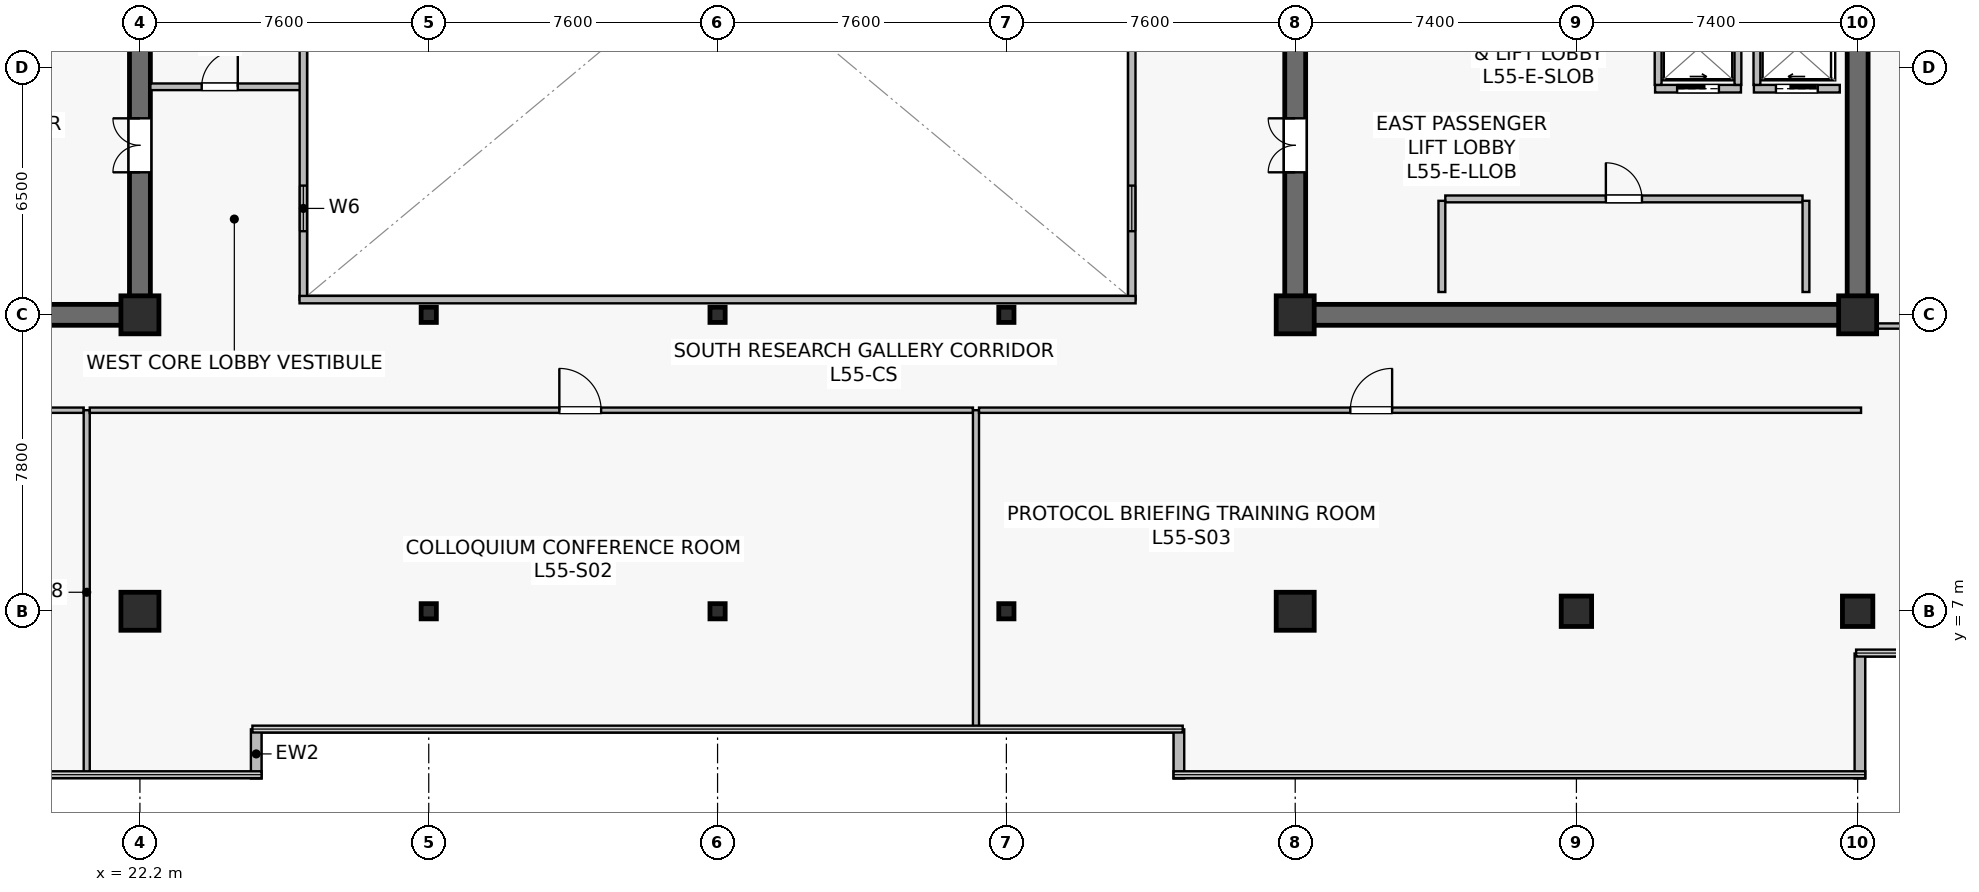
"""IFC4 building model, lengths in metres.
Left out: names, types, materials, properties, quantities, classifications, styles, units other than length and angle.
Written with IfcOpenShell. Run it as: python <this file> out.ifc"""

import sys

from ifc_helpers import new_model, si_unit, direction, frame, frame_2d, origin, origin_2d, place, context, subcontext, project, spatial, rectangle, hollow_rectangle, extrude, source, transform, mapped, element, fill, save


model = new_model("IFC4")
c1 = context("Model", 3, precision=1e-05, world=origin(), true_north=direction((0.0, 1.0)))
c2 = subcontext(c1, "Body", "Model", "MODEL_VIEW")
j1 = project(units=[si_unit("LENGTHUNIT", "METRE"), si_unit("PLANEANGLEUNIT", "RADIAN")], contexts=[c1])
p1 = place(None, origin())
s1 = spatial("IfcSite", under=j1, at=p1, CompositionType="ELEMENT")
p2 = place(p1, origin())
s2 = spatial("IfcBuilding", under=s1, at=p2, CompositionType="ELEMENT")
p3 = place(p2, frame((0.0, 0.0, 230.1)))
s3 = spatial("IfcBuildingStorey", under=s2, at=p3, CompositionType="ELEMENT", Elevation=230.1)
p4 = place(p3, frame((7.125, 14.8, 0.0), z_axis=(0.0, 0.0, 1.0), x_axis=(1.0, 0.0, 0.0)))
e1 = element("IfcWall", 1, at=p4, inside=s3, PredefinedType="SHEAR", context=c2, shape_type="SweptSolid", body=[
    extrude(rectangle(XDim=15.35, YDim=0.55, at=frame_2d((7.675, 0.0))), origin(), (0.0, 0.0, 1.0), 3.8),
])
p5 = place(p3, frame((22.2, 15.075, 0.0), z_axis=(0.0, 0.0, 1.0), x_axis=(0.0, 1.0, 0.0)))
e2 = element("IfcWall", 2, at=p5, inside=s3, PredefinedType="SHEAR", context=c2, shape_type="SweptSolid", body=[
    extrude(rectangle(XDim=18.45, YDim=0.55, at=frame_2d((9.225, 0.0))), origin(), (0.0, 0.0, 1.0), 3.8),
])
p6 = place(p5, frame((3.475, 0.0, 0.0)))
e3 = element("IfcOpeningElement", 3, at=p6, cuts=e2, PredefinedType="OPENING", context=c2, shape_type="SweptSolid", body=[
    extrude(rectangle(XDim=1.42, YDim=2.2, at=frame_2d((0.71, 1.1))), frame((0.0, 0.285, 0.0), z_axis=(0.0, -1.0, 0.0), x_axis=(1.0, 0.0, 0.0)), (0.0, 0.0, 1.0), 0.57),
])
p7 = place(p3, frame((52.325, 14.8, 0.0), z_axis=(0.0, 0.0, 1.0), x_axis=(1.0, 0.0, 0.0)))
e4 = element("IfcWall", 4, at=p7, inside=s3, PredefinedType="SHEAR", context=c2, shape_type="SweptSolid", body=[
    extrude(rectangle(XDim=15.35, YDim=0.55, at=frame_2d((7.675, 0.0))), origin(), (0.0, 0.0, 1.0), 3.8),
])
p8 = place(p3, frame((52.6, 15.075, 0.0), z_axis=(0.0, 0.0, 1.0), x_axis=(0.0, 1.0, 0.0)))
e5 = element("IfcWall", 5, at=p8, inside=s3, PredefinedType="SHEAR", context=c2, shape_type="SweptSolid", body=[
    extrude(rectangle(XDim=18.45, YDim=0.55, at=frame_2d((9.225, 0.0))), origin(), (0.0, 0.0, 1.0), 3.8),
])
p9 = place(p8, frame((3.475, 0.0, 0.0)))
e6 = element("IfcOpeningElement", 6, at=p9, cuts=e5, PredefinedType="OPENING", context=c2, shape_type="SweptSolid", body=[
    extrude(rectangle(XDim=1.42, YDim=2.2, at=frame_2d((0.71, 1.1))), frame((0.0, 0.285, 0.0), z_axis=(0.0, -1.0, 0.0), x_axis=(1.0, 0.0, 0.0)), (0.0, 0.0, 1.0), 0.57),
])
p10 = place(p3, frame((67.4, 15.075, 0.0), z_axis=(0.0, 0.0, 1.0), x_axis=(0.0, 1.0, 0.0)))
e7 = element("IfcWall", 7, at=p10, inside=s3, PredefinedType="SHEAR", context=c2, shape_type="SweptSolid", body=[
    extrude(rectangle(XDim=18.45, YDim=0.55, at=frame_2d((9.225, 0.0))), origin(), (0.0, 0.0, 1.0), 3.8),
])
m1 = source(origin(), c2, "Body", "SweptSolid", [
    extrude(rectangle(XDim=1.0, YDim=1.0, at=origin_2d()), origin(), (0.0, 0.0, 1.0), 4.1),
])
for number, where, z_axis, x_axis in (
    (8, (22.2, 7.0, 0.0), (0.0, 0.0, 1.0), (1.0, 0.0, 0.0)),
    (9, (22.2, 14.8, 0.0), (0.0, 0.0, 1.0), (1.0, 0.0, 0.0)),
    (10, (52.6, 7.0, 0.0), (0.0, 0.0, 1.0), (1.0, 0.0, 0.0)),
):
    element("IfcColumn", number, at=place(p3, frame(where, z_axis=z_axis, x_axis=x_axis)), inside=s3, PredefinedType="COLUMN", context=c2, shape_type="MappedRepresentation", body=[
        mapped(m1, transform((0.0, 0.0, 0.0), scale=1.0)),
    ])
m2 = source(origin(), c2, "Body", "SweptSolid", [
    extrude(rectangle(XDim=0.8, YDim=0.8, at=origin_2d()), origin(), (0.0, 0.0, 1.0), 4.1),
])
p11 = place(p3, frame((60.0, 7.0, 0.0), z_axis=(0.0, 0.0, 1.0), x_axis=(1.0, 0.0, 0.0)))
e11 = element("IfcColumn", 11, at=p11, inside=s3, PredefinedType="COLUMN", context=c2, shape_type="MappedRepresentation", body=[
    mapped(m2, transform((0.0, 0.0, 0.0), scale=1.0)),
])
for number, where, z_axis, x_axis in (
    (12, (52.6, 14.8, 0.0), (0.0, 0.0, 1.0), (1.0, 0.0, 0.0)),
    (13, (67.4, 14.8, 0.0), (0.0, 0.0, 1.0), (1.0, 0.0, 0.0)),
):
    element("IfcColumn", number, at=place(p3, frame(where, z_axis=z_axis, x_axis=x_axis)), inside=s3, PredefinedType="COLUMN", context=c2, shape_type="MappedRepresentation", body=[
        mapped(m1, transform((0.0, 0.0, 0.0), scale=1.0)),
    ])
p12 = place(p3, frame((67.4, 7.0, 0.0), z_axis=(0.0, 0.0, 1.0), x_axis=(1.0, 0.0, 0.0)))
e14 = element("IfcColumn", 14, at=p12, inside=s3, PredefinedType="COLUMN", context=c2, shape_type="MappedRepresentation", body=[
    mapped(m2, transform((0.0, 0.0, 0.0), scale=1.0)),
])
m3 = source(origin(), c2, "Body", "SweptSolid", [
    extrude(hollow_rectangle(XDim=0.4, YDim=0.4, WallThickness=0.019, at=origin_2d()), origin(), (0.0, 0.0, 1.0), 4.1),
])
for number, where, z_axis, x_axis in (
    (15, (29.8, 7.0, 0.0), (0.0, 0.0, 1.0), (1.0, 0.0, 0.0)),
    (16, (29.8, 14.8, 0.0), (0.0, 0.0, 1.0), (1.0, 0.0, 0.0)),
    (17, (37.4, 7.0, 0.0), (0.0, 0.0, 1.0), (1.0, 0.0, 0.0)),
    (18, (37.4, 14.8, 0.0), (0.0, 0.0, 1.0), (1.0, 0.0, 0.0)),
    (19, (45.0, 7.0, 0.0), (0.0, 0.0, 1.0), (1.0, 0.0, 0.0)),
    (20, (45.0, 14.8, 0.0), (0.0, 0.0, 1.0), (1.0, 0.0, 0.0)),
):
    element("IfcColumn", number, at=place(p3, frame(where, z_axis=z_axis, x_axis=x_axis)), inside=s3, PredefinedType="COLUMN", context=c2, shape_type="MappedRepresentation", body=[
        mapped(m3, transform((0.0, 0.0, 0.0), scale=1.0)),
    ])
for number, where, z_axis, x_axis in (
    (21, (25.26, 2.6, 0.0), (0.0, 0.0, 1.0), (0.0, 1.0, 0.0)),
    (22, (49.54, 3.893, 0.0), (0.0, 0.0, 1.0), (0.0, -1.0, 0.0)),
):
    element("IfcWall", number, at=place(p3, frame(where, z_axis=z_axis, x_axis=x_axis)), inside=s3, PredefinedType="STANDARD", context=c2, shape_type="SweptSolid", body=[
        extrude(rectangle(XDim=1.293, YDim=0.28, at=frame_2d((0.646, 0.0))), origin(), (0.0, 0.0, 1.0), 3.8),
    ])
p13 = place(p3, frame((67.46, 2.6, 0.0), z_axis=(0.0, 0.0, 1.0), x_axis=(0.0, 1.0, 0.0)))
e23 = element("IfcWall", 23, at=p13, inside=s3, PredefinedType="STANDARD", context=c2, shape_type="SweptSolid", body=[
    extrude(rectangle(XDim=3.288, YDim=0.28, at=frame_2d((1.644, 0.0))), origin(), (0.0, 0.0, 1.0), 3.8),
])
p14 = place(p3, frame((64.67, 20.75, 0.0), z_axis=(0.0, 0.0, 1.0), x_axis=(1.0, 0.0, 0.0)))
e24 = element("IfcWall", 24, at=p14, inside=s3, PredefinedType="SOLIDWALL", context=c2, shape_type="SweptSolid", body=[
    extrude(rectangle(XDim=2.26, YDim=0.2, at=frame_2d((1.13, 0.0))), origin(), (0.0, 0.0, 1.0), 3.8),
])
p15 = place(p14, frame((0.58, 0.0, 0.0)))
e25 = element("IfcOpeningElement", 25, at=p15, cuts=e24, PredefinedType="OPENING", context=c2, shape_type="SweptSolid", body=[
    extrude(rectangle(XDim=1.1, YDim=2.22, at=frame_2d((0.55, 1.11))), frame((0.0, 0.11, 0.0), z_axis=(0.0, -1.0, 0.0), x_axis=(1.0, 0.0, 0.0)), (0.0, 0.0, 1.0), 0.22),
])
p16 = place(p3, frame((64.75, 20.85, 0.0), z_axis=(0.0, 0.0, 1.0), x_axis=(0.0, 1.0, 0.0)))
e26 = element("IfcWall", 26, at=p16, inside=s3, PredefinedType="SOLIDWALL", context=c2, shape_type="SweptSolid", body=[
    extrude(rectangle(XDim=1.9, YDim=0.18, at=frame_2d((0.95, 0.0))), origin(), (0.0, 0.0, 1.0), 3.8),
])
p17 = place(p3, frame((62.07, 20.75, 0.0), z_axis=(0.0, 0.0, 1.0), x_axis=(1.0, 0.0, 0.0)))
e27 = element("IfcWall", 27, at=p17, inside=s3, PredefinedType="SOLIDWALL", context=c2, shape_type="SweptSolid", body=[
    extrude(rectangle(XDim=2.26, YDim=0.2, at=frame_2d((1.13, 0.0))), origin(), (0.0, 0.0, 1.0), 3.8),
])
p18 = place(p17, frame((0.58, 0.0, 0.0)))
e28 = element("IfcOpeningElement", 28, at=p18, cuts=e27, PredefinedType="OPENING", context=c2, shape_type="SweptSolid", body=[
    extrude(rectangle(XDim=1.1, YDim=2.22, at=frame_2d((0.55, 1.11))), frame((0.0, 0.11, 0.0), z_axis=(0.0, -1.0, 0.0), x_axis=(1.0, 0.0, 0.0)), (0.0, 0.0, 1.0), 0.22),
])
for number, where, z_axis, x_axis in (
    (29, (62.15, 20.85, 0.0), (0.0, 0.0, 1.0), (0.0, 1.0, 0.0)),
    (30, (64.25, 20.85, 0.0), (0.0, 0.0, 1.0), (0.0, 1.0, 0.0)),
):
    element("IfcWall", number, at=place(p3, frame(where, z_axis=z_axis, x_axis=x_axis)), inside=s3, PredefinedType="SOLIDWALL", context=c2, shape_type="SweptSolid", body=[
        extrude(rectangle(XDim=1.9, YDim=0.18, at=frame_2d((0.95, 0.0))), origin(), (0.0, 0.0, 1.0), 3.8),
    ])
p19 = place(p3, frame((56.55, 17.85, 0.0), z_axis=(0.0, 0.0, 1.0), x_axis=(1.0, 0.0, 0.0)))
e31 = element("IfcWall", 31, at=p19, inside=s3, PredefinedType="SOLIDWALL", context=c2, shape_type="SweptSolid", body=[
    extrude(rectangle(XDim=9.4, YDim=0.18, at=frame_2d((4.7, 0.0))), origin(), (0.0, 0.0, 1.0), 3.197),
])
p20 = place(p19, frame((4.225, 0.0, 0.0)))
e32 = element("IfcOpeningElement", 32, at=p20, cuts=e31, PredefinedType="OPENING", context=c2, shape_type="SweptSolid", body=[
    extrude(rectangle(XDim=0.95, YDim=2.15, at=frame_2d((0.475, 1.075))), frame((0.0, 0.1, 0.0), z_axis=(0.0, -1.0, 0.0), x_axis=(1.0, 0.0, 0.0)), (0.0, 0.0, 1.0), 0.2),
])
for number, where, z_axis, x_axis in (
    (33, (56.46, 15.4, 0.0), (0.0, 0.0, 1.0), (0.0, 1.0, 0.0)),
    (34, (66.04, 15.4, 0.0), (0.0, 0.0, 1.0), (0.0, 1.0, 0.0)),
):
    element("IfcWall", number, at=place(p3, frame(where, z_axis=z_axis, x_axis=x_axis)), inside=s3, PredefinedType="SOLIDWALL", context=c2, shape_type="SweptSolid", body=[
        extrude(rectangle(XDim=2.4, YDim=0.18, at=frame_2d((1.2, 0.0))), origin(), (0.0, 0.0, 1.0), 3.8),
    ])
p21 = place(p3, frame((22.475, 20.8, 0.0), z_axis=(0.0, 0.0, 1.0), x_axis=(1.0, 0.0, 0.0)))
e35 = element("IfcWall", 35, at=p21, inside=s3, PredefinedType="PARTITIONING", context=c2, shape_type="SweptSolid", body=[
    extrude(rectangle(XDim=4.025, YDim=0.175, at=frame_2d((2.012, 0.0))), origin(), (0.0, 0.0, 1.0), 3.8),
])
p22 = place(p21, frame((1.35, 0.0, 0.0)))
e36 = element("IfcOpeningElement", 36, at=p22, cuts=e35, PredefinedType="OPENING", context=c2, shape_type="SweptSolid", body=[
    extrude(rectangle(XDim=0.95, YDim=2.15, at=frame_2d((0.475, 1.075))), frame((0.0, 0.098, 0.0), z_axis=(0.0, -1.0, 0.0), x_axis=(1.0, 0.0, 0.0)), (0.0, 0.0, 1.0), 0.195),
])
p23 = place(p3, frame((26.5, 15.2, 0.0), z_axis=(0.0, 0.0, 1.0), x_axis=(0.0, 1.0, 0.0)))
e37 = element("IfcWall", 37, at=p23, inside=s3, PredefinedType="SOLIDWALL", context=c2, shape_type="SweptSolid", body=[
    extrude(rectangle(XDim=18.2, YDim=0.195, at=frame_2d((9.1, 0.0))), origin(), (0.0, 0.0, 1.0), 3.8),
])
p24 = place(p23, frame((1.8, 0.0, 0.9)))
e38 = element("IfcOpeningElement", 38, at=p24, cuts=e37, PredefinedType="OPENING", context=c2, shape_type="SweptSolid", body=[
    extrude(rectangle(XDim=1.2, YDim=1.35, at=frame_2d((0.6, 0.675))), frame((0.0, 0.107, 0.0), z_axis=(0.0, -1.0, 0.0), x_axis=(1.0, 0.0, 0.0)), (0.0, 0.0, 1.0), 0.215),
])
p25 = place(p23, frame((13.2, 0.0, 0.9)))
e39 = element("IfcOpeningElement", 39, at=p25, cuts=e37, PredefinedType="OPENING", context=c2, shape_type="SweptSolid", body=[
    extrude(rectangle(XDim=1.2, YDim=1.35, at=frame_2d((0.6, 0.675))), frame((0.0, 0.107, 0.0), z_axis=(0.0, -1.0, 0.0), x_axis=(1.0, 0.0, 0.0)), (0.0, 0.0, 1.0), 0.215),
])
p26 = place(p3, frame((48.3, 15.2, 0.0), z_axis=(0.0, 0.0, 1.0), x_axis=(0.0, 1.0, 0.0)))
e40 = element("IfcWall", 40, at=p26, inside=s3, PredefinedType="SOLIDWALL", context=c2, shape_type="SweptSolid", body=[
    extrude(rectangle(XDim=18.2, YDim=0.195, at=frame_2d((9.1, 0.0))), origin(), (0.0, 0.0, 1.0), 3.8),
])
p27 = place(p26, frame((1.8, 0.0, 0.9)))
e41 = element("IfcOpeningElement", 41, at=p27, cuts=e40, PredefinedType="OPENING", context=c2, shape_type="SweptSolid", body=[
    extrude(rectangle(XDim=1.2, YDim=1.35, at=frame_2d((0.6, 0.675))), frame((0.0, 0.107, 0.0), z_axis=(0.0, -1.0, 0.0), x_axis=(1.0, 0.0, 0.0)), (0.0, 0.0, 1.0), 0.215),
])
p28 = place(p26, frame((13.2, 0.0, 0.9)))
e42 = element("IfcOpeningElement", 42, at=p28, cuts=e40, PredefinedType="OPENING", context=c2, shape_type="SweptSolid", body=[
    extrude(rectangle(XDim=1.2, YDim=1.35, at=frame_2d((0.6, 0.675))), frame((0.0, 0.107, 0.0), z_axis=(0.0, -1.0, 0.0), x_axis=(1.0, 0.0, 0.0)), (0.0, 0.0, 1.0), 0.215),
])
p29 = place(p3, frame((26.4, 15.2, 0.0), z_axis=(0.0, 0.0, 1.0), x_axis=(1.0, 0.0, 0.0)))
e43 = element("IfcWall", 43, at=p29, inside=s3, PredefinedType="SOLIDWALL", context=c2, shape_type="SweptSolid", body=[
    extrude(rectangle(XDim=22.0, YDim=0.195, at=frame_2d((11.0, 0.0))), origin(), (0.0, 0.0, 1.0), 3.8),
])
p30 = place(p3, frame((7.31, 12.29, 0.0), z_axis=(0.0, 0.0, 1.0), x_axis=(1.0, 0.0, 0.0)))
e44 = element("IfcWall", 44, at=p30, inside=s3, PredefinedType="PARTITIONING", context=c2, shape_type="SweptSolid", body=[
    extrude(rectangle(XDim=13.41, YDim=0.14, at=frame_2d((6.705, 0.0))), origin(), (0.0, 0.0, 1.0), 3.197),
])
p31 = place(p30, frame((5.458, 0.0, 0.0)))
e45 = element("IfcOpeningElement", 45, at=p31, cuts=e44, PredefinedType="OPENING", context=c2, shape_type="SweptSolid", body=[
    extrude(rectangle(XDim=1.1, YDim=2.18, at=frame_2d((0.55, 1.09))), frame((0.0, 0.08, 0.0), z_axis=(0.0, -1.0, 0.0), x_axis=(1.0, 0.0, 0.0)), (0.0, 0.0, 1.0), 0.16),
])
p32 = place(p3, frame((20.8, 2.71, 0.0), z_axis=(0.0, 0.0, 1.0), x_axis=(0.0, 1.0, 0.0)))
e46 = element("IfcWall", 46, at=p32, inside=s3, PredefinedType="PARTITIONING", context=c2, shape_type="SweptSolid", body=[
    extrude(rectangle(XDim=9.58, YDim=0.16, at=frame_2d((4.79, 0.0))), origin(), (0.0, 0.0, 1.0), 3.135),
])
p33 = place(p3, frame((20.88, 12.29, 0.0), z_axis=(0.0, 0.0, 1.0), x_axis=(1.0, 0.0, 0.0)))
e47 = element("IfcWall", 47, at=p33, inside=s3, PredefinedType="PARTITIONING", context=c2, shape_type="SweptSolid", body=[
    extrude(rectangle(XDim=23.24, YDim=0.14, at=frame_2d((11.62, 0.0))), origin(), (0.0, 0.0, 1.0), 3.197),
])
p34 = place(p33, frame((12.356, 0.0, 0.0)))
e48 = element("IfcOpeningElement", 48, at=p34, cuts=e47, PredefinedType="OPENING", context=c2, shape_type="SweptSolid", body=[
    extrude(rectangle(XDim=1.1, YDim=2.18, at=frame_2d((0.55, 1.09))), frame((0.0, 0.08, 0.0), z_axis=(0.0, -1.0, 0.0), x_axis=(1.0, 0.0, 0.0)), (0.0, 0.0, 1.0), 0.16),
])
p35 = place(p3, frame((44.2, 3.91, 0.0), z_axis=(0.0, 0.0, 1.0), x_axis=(0.0, 1.0, 0.0)))
e49 = element("IfcWall", 49, at=p35, inside=s3, PredefinedType="PARTITIONING", context=c2, shape_type="SweptSolid", body=[
    extrude(rectangle(XDim=8.38, YDim=0.16, at=frame_2d((4.19, 0.0))), origin(), (0.0, 0.0, 1.0), 3.135),
])
p36 = place(p3, frame((44.28, 12.29, 0.0), z_axis=(0.0, 0.0, 1.0), x_axis=(1.0, 0.0, 0.0)))
e50 = element("IfcWall", 50, at=p36, inside=s3, PredefinedType="PARTITIONING", context=c2, shape_type="SweptSolid", body=[
    extrude(rectangle(XDim=23.21, YDim=0.14, at=frame_2d((11.605, 0.0))), origin(), (0.0, 0.0, 1.0), 3.197),
])
p37 = place(p36, frame((9.771, 0.0, 0.0)))
e51 = element("IfcOpeningElement", 51, at=p37, cuts=e50, PredefinedType="OPENING", context=c2, shape_type="SweptSolid", body=[
    extrude(rectangle(XDim=1.1, YDim=2.18, at=frame_2d((0.55, 1.09))), frame((0.0, 0.08, 0.0), z_axis=(0.0, -1.0, 0.0), x_axis=(1.0, 0.0, 0.0)), (0.0, 0.0, 1.0), 0.16),
])
p38 = place(p3, frame((67.78, 14.505, 0.0), z_axis=(0.0, 0.0, 1.0), x_axis=(1.0, 0.0, 0.0)))
e52 = element("IfcWall", 52, at=p38, inside=s3, PredefinedType="PARTITIONING", context=c2, shape_type="SweptSolid", body=[
    extrude(rectangle(XDim=2.91, YDim=0.14, at=frame_2d((1.455, 0.0))), origin(), (0.0, 0.0, 1.0), 3.8),
])
p39 = place(p38, frame((1.005, 0.0, 0.0)))
e53 = element("IfcOpeningElement", 53, at=p39, cuts=e52, PredefinedType="OPENING", context=c2, shape_type="SweptSolid", body=[
    extrude(rectangle(XDim=0.9, YDim=2.1, at=frame_2d((0.45, 1.05))), frame((0.0, 0.08, 0.0), z_axis=(0.0, -1.0, 0.0), x_axis=(1.0, 0.0, 0.0)), (0.0, 0.0, 1.0), 0.16),
])
m4 = source(origin(), c2, "Body", "SweptSolid", [
    extrude(rectangle(XDim=1.2, YDim=1.35, at=frame_2d((0.6, 0.675))), frame((0.0, 0.03, 0.0), z_axis=(0.0, -1.0, 0.0), x_axis=(1.0, 0.0, 0.0)), (0.0, 0.0, 1.0), 0.06),
])
p40 = place(p24, origin())
e54 = element("IfcWindow", 54, at=p40, inside=s3, PartitioningType="SINGLE_PANEL", PredefinedType="WINDOW", context=c2, shape_type="MappedRepresentation", body=[
    mapped(m4, transform((0.0, 0.0, 0.0), scale=1.0)),
])
fill(e38, e54)
p41 = place(p27, origin())
e55 = element("IfcWindow", 55, at=p41, inside=s3, PartitioningType="SINGLE_PANEL", PredefinedType="WINDOW", context=c2, shape_type="MappedRepresentation", body=[
    mapped(m4, transform((0.0, 0.0, 0.0), scale=1.0)),
])
fill(e41, e55)
m5 = source(origin(), c2, "Body", "SweptSolid", [
    extrude(rectangle(XDim=1.42, YDim=2.2, at=frame_2d((0.71, 1.1))), frame((0.0, 0.025, 0.0), z_axis=(0.0, -1.0, 0.0), x_axis=(1.0, 0.0, 0.0)), (0.0, 0.0, 1.0), 0.05),
])
p42 = place(p6, origin())
e56 = element("IfcDoor", 56, at=p42, inside=s3, OperationType="DOUBLE_DOOR_SINGLE_SWING", PredefinedType="DOOR", context=c2, shape_type="MappedRepresentation", body=[
    mapped(m5, transform((0.0, 0.0, 0.0), scale=1.0)),
])
fill(e3, e56)
m6 = source(origin(), c2, "Body", "SweptSolid", [
    extrude(rectangle(XDim=1.1, YDim=2.22, at=frame_2d((0.55, 1.11))), frame((0.0, 0.025, 0.0), z_axis=(0.0, -1.0, 0.0), x_axis=(1.0, 0.0, 0.0)), (0.0, 0.0, 1.0), 0.05),
])
p43 = place(p15, origin())
e57 = element("IfcDoor", 57, at=p43, inside=s3, OperationType="SLIDING_TO_LEFT", PredefinedType="USERDEFINED", context=c2, shape_type="MappedRepresentation", body=[
    mapped(m6, transform((0.0, 0.0, 0.0), scale=1.0)),
])
fill(e25, e57)
p44 = place(p18, origin())
e58 = element("IfcDoor", 58, at=p44, inside=s3, OperationType="SLIDING_TO_RIGHT", PredefinedType="USERDEFINED", context=c2, shape_type="MappedRepresentation", body=[
    mapped(m6, transform((0.0, 0.0, 0.0), scale=1.0)),
])
fill(e28, e58)
m7 = source(origin(), c2, "Body", "SweptSolid", [
    extrude(rectangle(XDim=0.95, YDim=2.15, at=frame_2d((0.475, 1.075))), frame((0.0, 0.025, 0.0), z_axis=(0.0, -1.0, 0.0), x_axis=(1.0, 0.0, 0.0)), (0.0, 0.0, 1.0), 0.05),
])
p45 = place(p20, origin())
e59 = element("IfcDoor", 59, at=p45, inside=s3, OperationType="SINGLE_SWING_LEFT", PredefinedType="DOOR", context=c2, shape_type="MappedRepresentation", body=[
    mapped(m7, transform((0.0, 0.0, 0.0), scale=1.0)),
])
fill(e32, e59)
p46 = place(p9, origin())
e60 = element("IfcDoor", 60, at=p46, inside=s3, OperationType="DOUBLE_DOOR_SINGLE_SWING", PredefinedType="DOOR", context=c2, shape_type="MappedRepresentation", body=[
    mapped(m5, transform((0.0, 0.0, 0.0), scale=1.0)),
])
fill(e6, e60)
p47 = place(p22, origin())
e61 = element("IfcDoor", 61, at=p47, inside=s3, OperationType="SINGLE_SWING_RIGHT", PredefinedType="DOOR", context=c2, shape_type="MappedRepresentation", body=[
    mapped(m7, transform((0.0, 0.0, 0.0), scale=1.0)),
])
fill(e36, e61)
m8 = source(origin(), c2, "Body", "SweptSolid", [
    extrude(rectangle(XDim=1.1, YDim=2.18, at=frame_2d((0.55, 1.09))), frame((0.0, 0.025, 0.0), z_axis=(0.0, -1.0, 0.0), x_axis=(1.0, 0.0, 0.0)), (0.0, 0.0, 1.0), 0.05),
])
p48 = place(p34, origin())
e62 = element("IfcDoor", 62, at=p48, inside=s3, OperationType="SINGLE_SWING_LEFT", PredefinedType="DOOR", context=c2, shape_type="MappedRepresentation", body=[
    mapped(m8, transform((0.0, 0.0, 0.0), scale=1.0)),
])
fill(e48, e62)
p49 = place(p37, origin())
e63 = element("IfcDoor", 63, at=p49, inside=s3, OperationType="SINGLE_SWING_RIGHT", PredefinedType="DOOR", context=c2, shape_type="MappedRepresentation", body=[
    mapped(m8, transform((0.0, 0.0, 0.0), scale=1.0)),
])
fill(e51, e63)
save(model, sys.argv[1])
